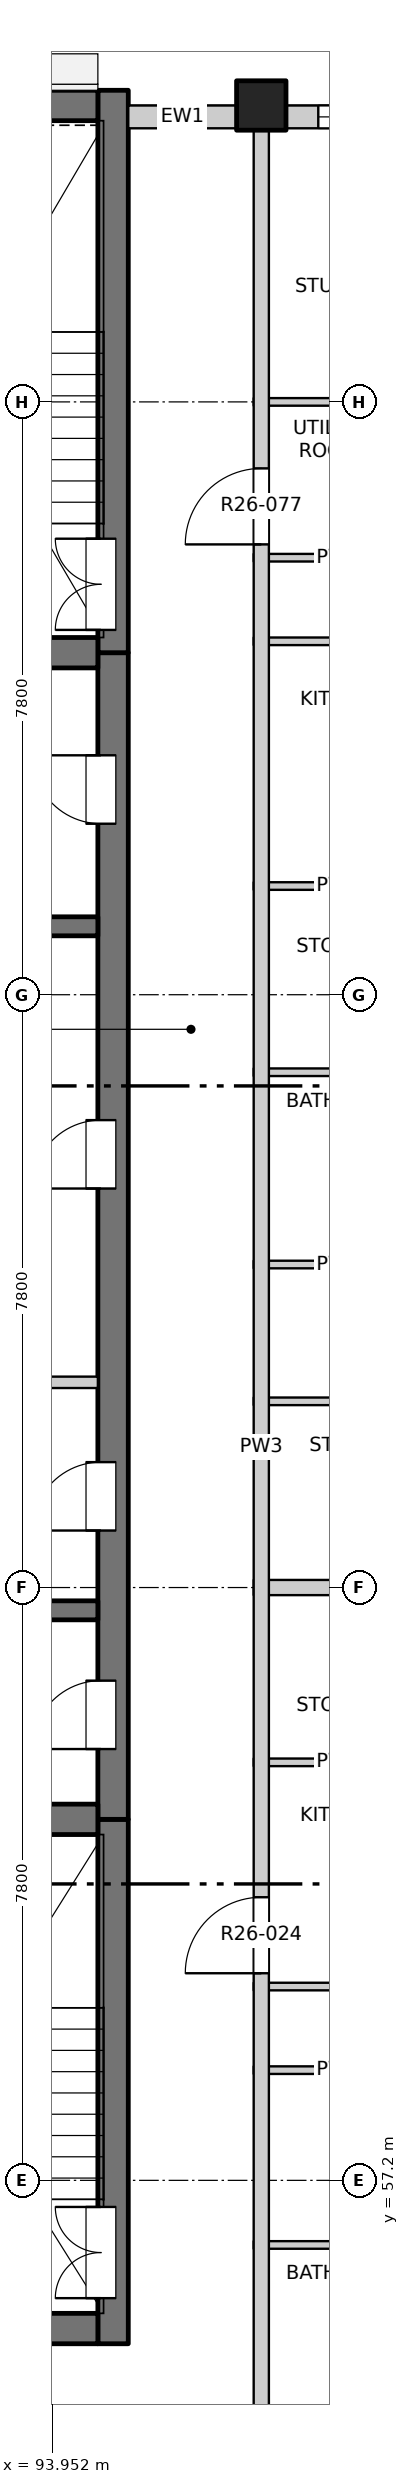
"""IFC4 building model, lengths in metres.
Left out: names, types, materials, properties, quantities, classifications, styles, units other than length and angle.
Written with IfcOpenShell. Run it as: python <this file> out.ifc"""

import sys

from ifc_helpers import new_model, si_unit, direction, frame, frame_2d, origin, origin_2d, place, context, subcontext, project, spatial, rectangle, extrude, element, fill, save


model = new_model("IFC4")
c1 = context("Model", 3, precision=1e-05, world=origin(), true_north=direction((0.0, 1.0)))
c2 = subcontext(c1, "Body", "Model", "MODEL_VIEW")
j1 = project(units=[si_unit("LENGTHUNIT", "METRE"), si_unit("PLANEANGLEUNIT", "RADIAN")], contexts=[c1])
p1 = place(None, origin())
s1 = spatial("IfcSite", under=j1, at=p1, CompositionType="ELEMENT")
p2 = place(p1, origin())
s2 = spatial("IfcBuilding", under=s1, at=p2, CompositionType="ELEMENT")
p3 = place(p2, frame((0.0, 0.0, 259.6)))
s3 = spatial("IfcBuildingStorey", under=s2, at=p3, CompositionType="ELEMENT", Elevation=259.6)
p4 = place(p3, frame((96.7, 84.5, -0.25), z_axis=(0.0, 0.0, 1.0), x_axis=(1.0, 0.0, 0.0)))
e1 = element("IfcColumn", 1, at=p4, inside=s3, PredefinedType="COLUMN", context=c2, shape_type="SweptSolid", body=[
    extrude(rectangle(XDim=0.65, YDim=0.65, at=origin_2d()), origin(), (0.0, 0.0, 1.0), 3.4),
])
p5 = place(p3, frame((94.75, 55.05, -0.25), z_axis=(0.0, 0.0, 1.0), x_axis=(0.0, 1.0, 0.0)))
e2 = element("IfcWall", 2, at=p5, inside=s3, PredefinedType="SOLIDWALL", context=c2, shape_type="SweptSolid", body=[
    extrude(rectangle(XDim=6.9, YDim=0.4, at=frame_2d((3.45, 0.0))), origin(), (0.0, 0.0, 1.0), 3.4),
])
p6 = place(p5, frame((0.6, 0.0, 0.25)))
e3 = element("IfcOpeningElement", 3, at=p6, cuts=e2, PredefinedType="OPENING", context=c2, shape_type="SweptSolid", body=[
    extrude(rectangle(XDim=1.2, YDim=2.1, at=frame_2d((0.6, 1.05))), frame((0.0, 0.21, 0.0), z_axis=(0.0, -1.0, 0.0), x_axis=(1.0, 0.0, 0.0)), (0.0, 0.0, 1.0), 0.42),
])
p7 = place(p3, frame((94.75, 61.95, -0.25), z_axis=(0.0, 0.0, 1.0), x_axis=(0.0, 1.0, 0.0)))
e4 = element("IfcWall", 4, at=p7, inside=s3, PredefinedType="SOLIDWALL", context=c2, shape_type="SweptSolid", body=[
    extrude(rectangle(XDim=15.35, YDim=0.4, at=frame_2d((7.675, 0.0))), origin(), (0.0, 0.0, 1.0), 3.4),
])
p8 = place(p7, frame((0.925, 0.0, 0.25)))
e5 = element("IfcOpeningElement", 5, at=p8, cuts=e4, PredefinedType="OPENING", context=c2, shape_type="SweptSolid", body=[
    extrude(rectangle(XDim=0.9, YDim=2.1, at=frame_2d((0.45, 1.05))), frame((0.0, 0.21, 0.0), z_axis=(0.0, -1.0, 0.0), x_axis=(1.0, 0.0, 0.0)), (0.0, 0.0, 1.0), 0.42),
])
p9 = place(p7, frame((3.8, 0.0, 0.25)))
e6 = element("IfcOpeningElement", 6, at=p9, cuts=e4, PredefinedType="OPENING", context=c2, shape_type="SweptSolid", body=[
    extrude(rectangle(XDim=0.9, YDim=2.1, at=frame_2d((0.45, 1.05))), frame((0.0, 0.21, 0.0), z_axis=(0.0, -1.0, 0.0), x_axis=(1.0, 0.0, 0.0)), (0.0, 0.0, 1.0), 0.42),
])
p10 = place(p7, frame((8.3, 0.0, 0.25)))
e7 = element("IfcOpeningElement", 7, at=p10, cuts=e4, PredefinedType="OPENING", context=c2, shape_type="SweptSolid", body=[
    extrude(rectangle(XDim=0.9, YDim=2.1, at=frame_2d((0.45, 1.05))), frame((0.0, 0.21, 0.0), z_axis=(0.0, -1.0, 0.0), x_axis=(1.0, 0.0, 0.0)), (0.0, 0.0, 1.0), 0.42),
])
p11 = place(p7, frame((13.1, 0.0, 0.25)))
e8 = element("IfcOpeningElement", 8, at=p11, cuts=e4, PredefinedType="OPENING", context=c2, shape_type="SweptSolid", body=[
    extrude(rectangle(XDim=0.9, YDim=2.1, at=frame_2d((0.45, 1.05))), frame((0.0, 0.21, 0.0), z_axis=(0.0, -1.0, 0.0), x_axis=(1.0, 0.0, 0.0)), (0.0, 0.0, 1.0), 0.42),
])
p12 = place(p3, frame((94.75, 77.3, -0.25), z_axis=(0.0, 0.0, 1.0), x_axis=(0.0, 1.0, 0.0)))
e9 = element("IfcWall", 9, at=p12, inside=s3, PredefinedType="SOLIDWALL", context=c2, shape_type="SweptSolid", body=[
    extrude(rectangle(XDim=7.4, YDim=0.4, at=frame_2d((3.7, 0.0))), origin(), (0.0, 0.0, 1.0), 3.4),
])
p13 = place(p12, frame((0.3, 0.0, 0.25)))
e10 = element("IfcOpeningElement", 10, at=p13, cuts=e9, PredefinedType="OPENING", context=c2, shape_type="SweptSolid", body=[
    extrude(rectangle(XDim=1.2, YDim=2.1, at=frame_2d((0.6, 1.05))), frame((0.0, 0.21, 0.0), z_axis=(0.0, -1.0, 0.0), x_axis=(1.0, 0.0, 0.0)), (0.0, 0.0, 1.0), 0.42),
])
p14 = place(p3, frame((75.45, 55.25, -0.25), z_axis=(0.0, 0.0, 1.0), x_axis=(1.0, 0.0, 0.0)))
e11 = element("IfcWall", 11, at=p14, inside=s3, PredefinedType="SOLIDWALL", context=c2, shape_type="SweptSolid", body=[
    extrude(rectangle(XDim=19.1, YDim=0.4, at=frame_2d((9.55, 0.0))), origin(), (0.0, 0.0, 1.0), 3.4),
])
p15 = place(p14, frame((8.8, 0.0, 0.25)))
e12 = element("IfcOpeningElement", 12, at=p15, cuts=e11, PredefinedType="OPENING", context=c2, shape_type="SweptSolid", body=[
    extrude(rectangle(XDim=1.5, YDim=2.1, at=frame_2d((0.75, 1.05))), frame((0.0, 0.21, 0.0), z_axis=(0.0, -1.0, 0.0), x_axis=(1.0, 0.0, 0.0)), (0.0, 0.0, 1.0), 0.42),
])
p16 = place(p3, frame((75.45, 84.5, -0.25), z_axis=(0.0, 0.0, 1.0), x_axis=(1.0, 0.0, 0.0)))
e13 = element("IfcWall", 13, at=p16, inside=s3, PredefinedType="SOLIDWALL", context=c2, shape_type="SweptSolid", body=[
    extrude(rectangle(XDim=19.1, YDim=0.4, at=frame_2d((9.55, 0.0))), origin(), (0.0, 0.0, 1.0), 3.4),
])
p17 = place(p3, frame((90.675, 61.95, -0.25), z_axis=(0.0, 0.0, 1.0), x_axis=(1.0, 0.0, 0.0)))
e14 = element("IfcWall", 14, at=p17, inside=s3, PredefinedType="SOLIDWALL", context=c2, shape_type="SweptSolid", body=[
    extrude(rectangle(XDim=3.875, YDim=0.4, at=frame_2d((1.938, 0.0))), origin(), (0.0, 0.0, 1.0), 3.4),
])
for number, where, z_axis, x_axis in (
    (15, (90.675, 64.7, -0.25), (0.0, 0.0, 1.0), (1.0, 0.0, 0.0)),
    (16, (90.675, 73.7, -0.25), (0.0, 0.0, 1.0), (1.0, 0.0, 0.0)),
):
    element("IfcWall", number, at=place(p3, frame(where, z_axis=z_axis, x_axis=x_axis)), inside=s3, PredefinedType="SOLIDWALL", context=c2, shape_type="SweptSolid", body=[
        extrude(rectangle(XDim=3.875, YDim=0.25, at=frame_2d((1.938, 0.0))), origin(), (0.0, 0.0, 1.0), 3.4),
    ])
p18 = place(p3, frame((90.675, 77.3, -0.25), z_axis=(0.0, 0.0, 1.0), x_axis=(1.0, 0.0, 0.0)))
e17 = element("IfcWall", 17, at=p18, inside=s3, PredefinedType="SOLIDWALL", context=c2, shape_type="SweptSolid", body=[
    extrude(rectangle(XDim=3.875, YDim=0.4, at=frame_2d((1.938, 0.0))), origin(), (0.0, 0.0, 1.0), 3.4),
])
p19 = place(p3, frame((94.95, 84.35, 0.0), z_axis=(0.0, 0.0, 1.0), x_axis=(1.0, 0.0, 0.0)))
e18 = element("IfcWall", 18, at=p19, inside=s3, PredefinedType="SOLIDWALL", context=c2, shape_type="SweptSolid", body=[
    extrude(rectangle(XDim=1.425, YDim=0.3, at=frame_2d((0.712, 0.0))), origin(), (0.0, 0.0, 1.0), 3.15),
])
p20 = place(p3, frame((97.025, 84.35, 0.0), z_axis=(0.0, 0.0, 1.0), x_axis=(1.0, 0.0, 0.0)))
e19 = element("IfcWall", 19, at=p20, inside=s3, PredefinedType="SOLIDWALL", context=c2, shape_type="SweptSolid", body=[
    extrude(rectangle(XDim=3.575, YDim=0.3, at=frame_2d((1.788, 0.0))), origin(), (0.0, 0.0, 1.0), 3.15),
])
p21 = place(p20, frame((0.425, 0.0, 0.9)))
e20 = element("IfcOpeningElement", 20, at=p21, cuts=e19, PredefinedType="OPENING", context=c2, shape_type="SweptSolid", body=[
    extrude(rectangle(XDim=2.4, YDim=1.8, at=frame_2d((1.2, 0.9))), frame((0.0, 0.16, 0.0), z_axis=(0.0, -1.0, 0.0), x_axis=(1.0, 0.0, 0.0)), (0.0, 0.0, 1.0), 0.32),
])
for number, where, z_axis, x_axis in (
    (21, (96.6, 56.35, 0.0), (0.0, 0.0, 1.0), (1.0, 0.0, 0.0)),
    (22, (96.6, 58.65, 0.0), (0.0, 0.0, 1.0), (1.0, 0.0, 0.0)),
    (23, (96.6, 59.75, 0.0), (0.0, 0.0, 1.0), (1.0, 0.0, 0.0)),
    (24, (96.6, 62.7, 0.0), (0.0, 0.0, 1.0), (1.0, 0.0, 0.0)),
):
    element("IfcWall", number, at=place(p3, frame(where, z_axis=z_axis, x_axis=x_axis)), inside=s3, PredefinedType="PARTITIONING", context=c2, shape_type="SweptSolid", body=[
        extrude(rectangle(XDim=2.22, YDim=0.1, at=frame_2d((1.11, 0.0))), origin(), (0.0, 0.0, 1.0), 3.15),
    ])
p22 = place(p3, frame((96.6, 65.0, 0.0), z_axis=(0.0, 0.0, 1.0), x_axis=(1.0, 0.0, 0.0)))
e25 = element("IfcWall", 25, at=p22, inside=s3, PredefinedType="PARTITIONING", context=c2, shape_type="SweptSolid", body=[
    extrude(rectangle(XDim=7.6, YDim=0.2, at=frame_2d((3.8, 0.0))), origin(), (0.0, 0.0, 1.0), 3.15),
])
p23 = place(p3, frame((96.6, 67.45, 0.0), z_axis=(0.0, 0.0, 1.0), x_axis=(1.0, 0.0, 0.0)))
e26 = element("IfcWall", 26, at=p23, inside=s3, PredefinedType="PARTITIONING", context=c2, shape_type="SweptSolid", body=[
    extrude(rectangle(XDim=2.22, YDim=0.1, at=frame_2d((1.11, 0.0))), origin(), (0.0, 0.0, 1.0), 3.15),
])
p24 = place(p3, frame((90.675, 67.7, 0.0), z_axis=(0.0, 0.0, 1.0), x_axis=(1.0, 0.0, 0.0)))
e27 = element("IfcWall", 27, at=p24, inside=s3, PredefinedType="PARTITIONING", context=c2, shape_type="SweptSolid", body=[
    extrude(rectangle(XDim=3.875, YDim=0.15, at=frame_2d((1.938, 0.0))), origin(), (0.0, 0.0, 1.0), 3.15),
])
for number, where, z_axis, x_axis in (
    (28, (96.6, 69.25, 0.0), (0.0, 0.0, 1.0), (1.0, 0.0, 0.0)),
    (29, (96.6, 71.78, 0.0), (0.0, 0.0, 1.0), (1.0, 0.0, 0.0)),
    (30, (96.6, 74.23, 0.0), (0.0, 0.0, 1.0), (1.0, 0.0, 0.0)),
    (31, (96.6, 77.45, 0.0), (0.0, 0.0, 1.0), (1.0, 0.0, 0.0)),
    (32, (96.6, 78.55, 0.0), (0.0, 0.0, 1.0), (1.0, 0.0, 0.0)),
):
    element("IfcWall", number, at=place(p3, frame(where, z_axis=z_axis, x_axis=x_axis)), inside=s3, PredefinedType="PARTITIONING", context=c2, shape_type="SweptSolid", body=[
        extrude(rectangle(XDim=2.22, YDim=0.1, at=frame_2d((1.11, 0.0))), origin(), (0.0, 0.0, 1.0), 3.15),
    ])
p25 = place(p3, frame((96.6, 80.6, 0.0), z_axis=(0.0, 0.0, 1.0), x_axis=(1.0, 0.0, 0.0)))
e33 = element("IfcWall", 33, at=p25, inside=s3, PredefinedType="PARTITIONING", context=c2, shape_type="SweptSolid", body=[
    extrude(rectangle(XDim=7.6, YDim=0.1, at=frame_2d((3.8, 0.0))), origin(), (0.0, 0.0, 1.0), 3.15),
])
p26 = place(p25, frame((2.61, 0.0, 0.0)))
e34 = element("IfcOpeningElement", 34, at=p26, cuts=e33, PredefinedType="OPENING", context=c2, shape_type="SweptSolid", body=[
    extrude(rectangle(XDim=0.9, YDim=2.1, at=frame_2d((0.45, 1.05))), frame((0.0, 0.06, 0.0), z_axis=(0.0, -1.0, 0.0), x_axis=(1.0, 0.0, 0.0)), (0.0, 0.0, 1.0), 0.12),
])
p27 = place(p3, frame((96.7, 49.5, 0.0), z_axis=(0.0, 0.0, 1.0), x_axis=(0.0, 1.0, 0.0)))
e35 = element("IfcWall", 35, at=p27, inside=s3, PredefinedType="PARTITIONING", context=c2, shape_type="SweptSolid", body=[
    extrude(rectangle(XDim=34.7, YDim=0.2, at=frame_2d((17.35, 0.0))), origin(), (0.0, 0.0, 1.0), 3.15),
])
p28 = place(p27, frame((10.425, 0.0, 0.0)))
e36 = element("IfcOpeningElement", 36, at=p28, cuts=e35, PredefinedType="OPENING", context=c2, shape_type="SweptSolid", body=[
    extrude(rectangle(XDim=1.0, YDim=2.1, at=frame_2d((0.5, 1.05))), frame((0.0, 0.11, 0.0), z_axis=(0.0, -1.0, 0.0), x_axis=(1.0, 0.0, 0.0)), (0.0, 0.0, 1.0), 0.22),
])
p29 = place(p27, frame((29.225, 0.0, 0.0)))
e37 = element("IfcOpeningElement", 37, at=p29, cuts=e35, PredefinedType="OPENING", context=c2, shape_type="SweptSolid", body=[
    extrude(rectangle(XDim=1.0, YDim=2.1, at=frame_2d((0.5, 1.05))), frame((0.0, 0.11, 0.0), z_axis=(0.0, -1.0, 0.0), x_axis=(1.0, 0.0, 0.0)), (0.0, 0.0, 1.0), 0.22),
])
p30 = place(p21, origin())
e38 = element("IfcWindow", 38, at=p30, inside=s3, PartitioningType="DOUBLE_PANEL_VERTICAL", PredefinedType="WINDOW", context=c2, shape_type="SweptSolid", body=[
    extrude(rectangle(XDim=2.4, YDim=1.8, at=frame_2d((1.2, 0.9))), frame((0.0, 0.03, 0.0), z_axis=(0.0, -1.0, 0.0), x_axis=(1.0, 0.0, 0.0)), (0.0, 0.0, 1.0), 0.06),
])
fill(e20, e38)
p31 = place(p6, origin())
e39 = element("IfcDoor", 39, at=p31, inside=s3, OperationType="DOUBLE_DOOR_SINGLE_SWING", PredefinedType="DOOR", context=c2, shape_type="SweptSolid", body=[
    extrude(rectangle(XDim=1.2, YDim=2.1, at=frame_2d((0.6, 1.05))), frame((0.0, 0.185, 0.0), z_axis=(0.0, -1.0, 0.0), x_axis=(1.0, 0.0, 0.0)), (0.0, 0.0, 1.0), 0.05),
])
fill(e3, e39)
p32 = place(p28, origin())
e40 = element("IfcDoor", 40, at=p32, inside=s3, OperationType="SINGLE_SWING_LEFT", PredefinedType="DOOR", context=c2, shape_type="SweptSolid", body=[
    extrude(rectangle(XDim=1.0, YDim=2.1, at=frame_2d((0.5, 1.05))), frame((0.0, 0.025, 0.0), z_axis=(0.0, -1.0, 0.0), x_axis=(1.0, 0.0, 0.0)), (0.0, 0.0, 1.0), 0.05),
])
fill(e36, e40)
p33 = place(p8, origin())
e41 = element("IfcDoor", 41, at=p33, inside=s3, OperationType="SINGLE_SWING_LEFT", PredefinedType="DOOR", context=c2, shape_type="SweptSolid", body=[
    extrude(rectangle(XDim=0.9, YDim=2.1, at=frame_2d((0.45, 1.05))), frame((0.0, 0.185, 0.0), z_axis=(0.0, -1.0, 0.0), x_axis=(1.0, 0.0, 0.0)), (0.0, 0.0, 1.0), 0.05),
])
fill(e5, e41)
p34 = place(p9, origin())
e42 = element("IfcDoor", 42, at=p34, inside=s3, OperationType="SINGLE_SWING_LEFT", PredefinedType="DOOR", context=c2, shape_type="SweptSolid", body=[
    extrude(rectangle(XDim=0.9, YDim=2.1, at=frame_2d((0.45, 1.05))), frame((0.0, 0.185, 0.0), z_axis=(0.0, -1.0, 0.0), x_axis=(1.0, 0.0, 0.0)), (0.0, 0.0, 1.0), 0.05),
])
fill(e6, e42)
p35 = place(p10, origin())
e43 = element("IfcDoor", 43, at=p35, inside=s3, OperationType="SINGLE_SWING_LEFT", PredefinedType="DOOR", context=c2, shape_type="SweptSolid", body=[
    extrude(rectangle(XDim=0.9, YDim=2.1, at=frame_2d((0.45, 1.05))), frame((0.0, 0.185, 0.0), z_axis=(0.0, -1.0, 0.0), x_axis=(1.0, 0.0, 0.0)), (0.0, 0.0, 1.0), 0.05),
])
fill(e7, e43)
p36 = place(p11, origin())
e44 = element("IfcDoor", 44, at=p36, inside=s3, OperationType="SINGLE_SWING_RIGHT", PredefinedType="DOOR", context=c2, shape_type="SweptSolid", body=[
    extrude(rectangle(XDim=0.9, YDim=2.1, at=frame_2d((0.45, 1.05))), frame((0.0, 0.185, 0.0), z_axis=(0.0, -1.0, 0.0), x_axis=(1.0, 0.0, 0.0)), (0.0, 0.0, 1.0), 0.05),
])
fill(e8, e44)
p37 = place(p13, origin())
e45 = element("IfcDoor", 45, at=p37, inside=s3, OperationType="DOUBLE_DOOR_SINGLE_SWING", PredefinedType="DOOR", context=c2, shape_type="SweptSolid", body=[
    extrude(rectangle(XDim=1.2, YDim=2.1, at=frame_2d((0.6, 1.05))), frame((0.0, 0.185, 0.0), z_axis=(0.0, -1.0, 0.0), x_axis=(1.0, 0.0, 0.0)), (0.0, 0.0, 1.0), 0.05),
])
fill(e10, e45)
p38 = place(p29, origin())
e46 = element("IfcDoor", 46, at=p38, inside=s3, OperationType="SINGLE_SWING_LEFT", PredefinedType="DOOR", context=c2, shape_type="SweptSolid", body=[
    extrude(rectangle(XDim=1.0, YDim=2.1, at=frame_2d((0.5, 1.05))), frame((0.0, 0.025, 0.0), z_axis=(0.0, -1.0, 0.0), x_axis=(1.0, 0.0, 0.0)), (0.0, 0.0, 1.0), 0.05),
])
fill(e37, e46)
save(model, sys.argv[1])
